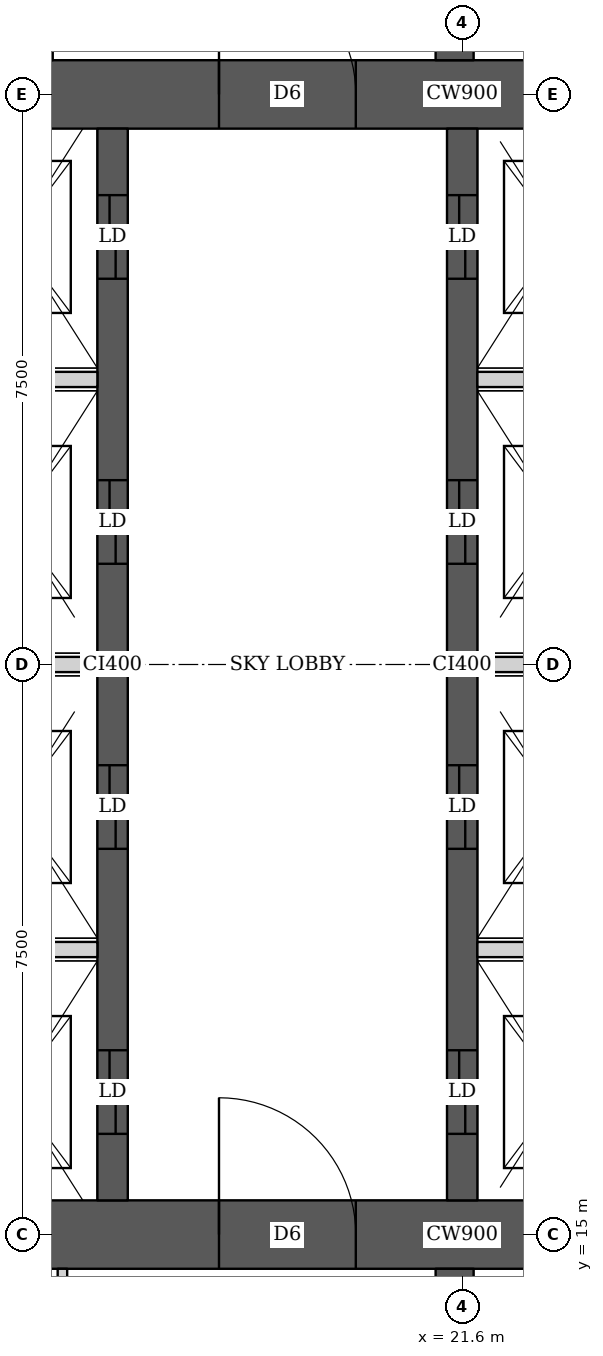
"""IFC4 building model, lengths in metres.
Left out: names, types, materials, properties, quantities, classifications, styles, units other than length and angle.
Written with IfcOpenShell. Run it as: python <this file> out.ifc"""

import sys

from ifc_helpers import new_model, si_unit, direction, frame, frame_2d, origin, place, context, subcontext, project, spatial, rectangle, extrude, element, fill, save


model = new_model("IFC4")
c1 = context("Model", 3, precision=1e-05, world=origin(), true_north=direction((0.0, 1.0)))
c2 = subcontext(c1, "Body", "Model", "MODEL_VIEW")
j1 = project(units=[si_unit("LENGTHUNIT", "METRE"), si_unit("PLANEANGLEUNIT", "RADIAN")], contexts=[c1])
p1 = place(None, origin())
s1 = spatial("IfcSite", under=j1, at=p1, CompositionType="ELEMENT")
p2 = place(p1, origin())
s2 = spatial("IfcBuilding", under=s1, at=p2, CompositionType="ELEMENT")
p3 = place(p2, frame((0.0, 0.0, 130.4)))
s3 = spatial("IfcBuildingStorey", under=s2, at=p3, CompositionType="ELEMENT", Elevation=130.4)
p4 = place(p3, frame((13.95, 15.0, 0.0), z_axis=(0.0, 0.0, 1.0), x_axis=(1.0, 0.0, 0.0)))
e1 = element("IfcWall", 1, at=p4, inside=s3, PredefinedType="SHEAR", context=c2, shape_type="SweptSolid", body=[
    extrude(rectangle(XDim=15.3, YDim=0.9, at=frame_2d((7.65, 0.0))), origin(), (0.0, 0.0, 1.0), 5.4),
])
p5 = place(p4, frame((4.45, 0.0, 0.0)))
e2 = element("IfcOpeningElement", 2, at=p5, cuts=e1, PredefinedType="OPENING", context=c2, shape_type="SweptSolid", body=[
    extrude(rectangle(XDim=1.8, YDim=2.1, at=frame_2d((0.9, 1.05))), frame((0.0, 0.46, 0.0), z_axis=(0.0, -1.0, 0.0), x_axis=(1.0, 0.0, 0.0)), (0.0, 0.0, 1.0), 0.92),
])
p6 = place(p4, frame((10.7, 0.0, 0.0)))
e3 = element("IfcOpeningElement", 3, at=p6, cuts=e1, PredefinedType="OPENING", context=c2, shape_type="SweptSolid", body=[
    extrude(rectangle(XDim=1.1, YDim=2.1, at=frame_2d((0.55, 1.05))), frame((0.0, 0.46, 0.0), z_axis=(0.0, -1.0, 0.0), x_axis=(1.0, 0.0, 0.0)), (0.0, 0.0, 1.0), 0.92),
])
p7 = place(p3, frame((13.95, 30.0, 0.0), z_axis=(0.0, 0.0, 1.0), x_axis=(1.0, 0.0, 0.0)))
e4 = element("IfcWall", 4, at=p7, inside=s3, PredefinedType="SHEAR", context=c2, shape_type="SweptSolid", body=[
    extrude(rectangle(XDim=15.3, YDim=0.9, at=frame_2d((7.65, 0.0))), origin(), (0.0, 0.0, 1.0), 5.4),
])
p8 = place(p7, frame((4.45, 0.0, 0.0)))
e5 = element("IfcOpeningElement", 5, at=p8, cuts=e4, PredefinedType="OPENING", context=c2, shape_type="SweptSolid", body=[
    extrude(rectangle(XDim=1.8, YDim=2.1, at=frame_2d((0.9, 1.05))), frame((0.0, 0.46, 0.0), z_axis=(0.0, -1.0, 0.0), x_axis=(1.0, 0.0, 0.0)), (0.0, 0.0, 1.0), 0.92),
])
p9 = place(p7, frame((10.7, 0.0, 0.0)))
e6 = element("IfcOpeningElement", 6, at=p9, cuts=e4, PredefinedType="OPENING", context=c2, shape_type="SweptSolid", body=[
    extrude(rectangle(XDim=1.1, YDim=2.1, at=frame_2d((0.55, 1.05))), frame((0.0, 0.46, 0.0), z_axis=(0.0, -1.0, 0.0), x_axis=(1.0, 0.0, 0.0)), (0.0, 0.0, 1.0), 0.92),
])
p10 = place(p3, frame((17.0, 15.45, 0.0), z_axis=(0.0, 0.0, 1.0), x_axis=(0.0, 1.0, 0.0)))
e7 = element("IfcWall", 7, at=p10, inside=s3, PredefinedType="SHEAR", context=c2, shape_type="SweptSolid", body=[
    extrude(rectangle(XDim=14.1, YDim=0.4, at=frame_2d((7.05, 0.0))), origin(), (0.0, 0.0, 1.0), 5.4),
])
p11 = place(p10, frame((0.875, 0.0, 0.0)))
e8 = element("IfcOpeningElement", 8, at=p11, cuts=e7, PredefinedType="OPENING", context=c2, shape_type="SweptSolid", body=[
    extrude(rectangle(XDim=1.1, YDim=2.1, at=frame_2d((0.55, 1.05))), frame((0.0, 0.21, 0.0), z_axis=(0.0, -1.0, 0.0), x_axis=(1.0, 0.0, 0.0)), (0.0, 0.0, 1.0), 0.42),
])
p12 = place(p10, frame((4.625, 0.0, 0.0)))
e9 = element("IfcOpeningElement", 9, at=p12, cuts=e7, PredefinedType="OPENING", context=c2, shape_type="SweptSolid", body=[
    extrude(rectangle(XDim=1.1, YDim=2.1, at=frame_2d((0.55, 1.05))), frame((0.0, 0.21, 0.0), z_axis=(0.0, -1.0, 0.0), x_axis=(1.0, 0.0, 0.0)), (0.0, 0.0, 1.0), 0.42),
])
p13 = place(p10, frame((8.375, 0.0, 0.0)))
e10 = element("IfcOpeningElement", 10, at=p13, cuts=e7, PredefinedType="OPENING", context=c2, shape_type="SweptSolid", body=[
    extrude(rectangle(XDim=1.1, YDim=2.1, at=frame_2d((0.55, 1.05))), frame((0.0, 0.21, 0.0), z_axis=(0.0, -1.0, 0.0), x_axis=(1.0, 0.0, 0.0)), (0.0, 0.0, 1.0), 0.42),
])
p14 = place(p10, frame((12.125, 0.0, 0.0)))
e11 = element("IfcOpeningElement", 11, at=p14, cuts=e7, PredefinedType="OPENING", context=c2, shape_type="SweptSolid", body=[
    extrude(rectangle(XDim=1.1, YDim=2.1, at=frame_2d((0.55, 1.05))), frame((0.0, 0.21, 0.0), z_axis=(0.0, -1.0, 0.0), x_axis=(1.0, 0.0, 0.0)), (0.0, 0.0, 1.0), 0.42),
])
p15 = place(p3, frame((21.6, 15.45, 0.0), z_axis=(0.0, 0.0, 1.0), x_axis=(0.0, 1.0, 0.0)))
e12 = element("IfcWall", 12, at=p15, inside=s3, PredefinedType="SHEAR", context=c2, shape_type="SweptSolid", body=[
    extrude(rectangle(XDim=14.1, YDim=0.4, at=frame_2d((7.05, 0.0))), origin(), (0.0, 0.0, 1.0), 5.4),
])
p16 = place(p15, frame((0.875, 0.0, 0.0)))
e13 = element("IfcOpeningElement", 13, at=p16, cuts=e12, PredefinedType="OPENING", context=c2, shape_type="SweptSolid", body=[
    extrude(rectangle(XDim=1.1, YDim=2.1, at=frame_2d((0.55, 1.05))), frame((0.0, 0.21, 0.0), z_axis=(0.0, -1.0, 0.0), x_axis=(1.0, 0.0, 0.0)), (0.0, 0.0, 1.0), 0.42),
])
p17 = place(p15, frame((4.625, 0.0, 0.0)))
e14 = element("IfcOpeningElement", 14, at=p17, cuts=e12, PredefinedType="OPENING", context=c2, shape_type="SweptSolid", body=[
    extrude(rectangle(XDim=1.1, YDim=2.1, at=frame_2d((0.55, 1.05))), frame((0.0, 0.21, 0.0), z_axis=(0.0, -1.0, 0.0), x_axis=(1.0, 0.0, 0.0)), (0.0, 0.0, 1.0), 0.42),
])
p18 = place(p15, frame((8.375, 0.0, 0.0)))
e15 = element("IfcOpeningElement", 15, at=p18, cuts=e12, PredefinedType="OPENING", context=c2, shape_type="SweptSolid", body=[
    extrude(rectangle(XDim=1.1, YDim=2.1, at=frame_2d((0.55, 1.05))), frame((0.0, 0.21, 0.0), z_axis=(0.0, -1.0, 0.0), x_axis=(1.0, 0.0, 0.0)), (0.0, 0.0, 1.0), 0.42),
])
p19 = place(p15, frame((12.125, 0.0, 0.0)))
e16 = element("IfcOpeningElement", 16, at=p19, cuts=e12, PredefinedType="OPENING", context=c2, shape_type="SweptSolid", body=[
    extrude(rectangle(XDim=1.1, YDim=2.1, at=frame_2d((0.55, 1.05))), frame((0.0, 0.21, 0.0), z_axis=(0.0, -1.0, 0.0), x_axis=(1.0, 0.0, 0.0)), (0.0, 0.0, 1.0), 0.42),
])
for number, where, z_axis, x_axis in (
    (17, (21.5, 10.35, 0.0), (0.0, 0.0, 1.0), (0.0, 1.0, 0.0)),
    (18, (21.5, 30.45, 0.0), (0.0, 0.0, 1.0), (0.0, 1.0, 0.0)),
):
    element("IfcWall", number, at=place(p3, frame(where, z_axis=z_axis, x_axis=x_axis)), inside=s3, PredefinedType="SHEAR", context=c2, shape_type="SweptSolid", body=[
        extrude(rectangle(XDim=4.2, YDim=0.5, at=frame_2d((2.1, 0.0))), origin(), (0.0, 0.0, 1.0), 5.4),
    ])
p20 = place(p3, frame((16.34, 10.163, 0.0), z_axis=(0.0, 0.0, 1.0), x_axis=(0.0, 1.0, 0.0)))
e19 = element("IfcWall", 19, at=p20, inside=s3, PredefinedType="PARTITIONING", context=c2, shape_type="SweptSolid", body=[
    extrude(rectangle(XDim=4.387, YDim=0.125, at=frame_2d((2.193, 0.0))), origin(), (0.0, 0.0, 1.0), 5.15),
])
p21 = place(p20, frame((1.637, 0.0, 0.0)))
e20 = element("IfcOpeningElement", 20, at=p21, cuts=e19, PredefinedType="OPENING", context=c2, shape_type="SweptSolid", body=[
    extrude(rectangle(XDim=1.0, YDim=2.1, at=frame_2d((0.5, 1.05))), frame((0.0, 0.073, 0.0), z_axis=(0.0, -1.0, 0.0), x_axis=(1.0, 0.0, 0.0)), (0.0, 0.0, 1.0), 0.145),
])
p22 = place(p3, frame((16.15, 30.45, 0.0), z_axis=(0.0, 0.0, 1.0), x_axis=(0.0, 1.0, 0.0)))
e21 = element("IfcWall", 21, at=p22, inside=s3, PredefinedType="PARTITIONING", context=c2, shape_type="SweptSolid", body=[
    extrude(rectangle(XDim=4.387, YDim=0.125, at=frame_2d((2.193, 0.0))), origin(), (0.0, 0.0, 1.0), 5.15),
])
p23 = place(p22, frame((1.75, 0.0, 0.0)))
e22 = element("IfcOpeningElement", 22, at=p23, cuts=e21, PredefinedType="OPENING", context=c2, shape_type="SweptSolid", body=[
    extrude(rectangle(XDim=1.0, YDim=2.1, at=frame_2d((0.5, 1.05))), frame((0.0, 0.073, 0.0), z_axis=(0.0, -1.0, 0.0), x_axis=(1.0, 0.0, 0.0)), (0.0, 0.0, 1.0), 0.145),
])
p24 = place(p3, frame((14.85, 18.75, 0.0), z_axis=(0.0, 0.0, 1.0), x_axis=(1.0, 0.0, 0.0)))
e23 = element("IfcWall", 23, at=p24, inside=s3, PredefinedType="SOLIDWALL", context=c2, shape_type="SweptSolid", body=[
    extrude(rectangle(XDim=1.95, YDim=0.2, at=frame_2d((0.975, 0.0))), origin(), (0.0, 0.0, 1.0), 5.15),
])
p25 = place(p3, frame((21.8, 18.75, 0.0), z_axis=(0.0, 0.0, 1.0), x_axis=(1.0, 0.0, 0.0)))
e24 = element("IfcWall", 24, at=p25, inside=s3, PredefinedType="SOLIDWALL", context=c2, shape_type="SweptSolid", body=[
    extrude(rectangle(XDim=2.2, YDim=0.2, at=frame_2d((1.1, 0.0))), origin(), (0.0, 0.0, 1.0), 5.15),
])
p26 = place(p3, frame((14.85, 22.5, 0.0), z_axis=(0.0, 0.0, 1.0), x_axis=(1.0, 0.0, 0.0)))
e25 = element("IfcWall", 25, at=p26, inside=s3, PredefinedType="SOLIDWALL", context=c2, shape_type="SweptSolid", body=[
    extrude(rectangle(XDim=1.95, YDim=0.2, at=frame_2d((0.975, 0.0))), origin(), (0.0, 0.0, 1.0), 5.15),
])
p27 = place(p3, frame((21.8, 22.5, 0.0), z_axis=(0.0, 0.0, 1.0), x_axis=(1.0, 0.0, 0.0)))
e26 = element("IfcWall", 26, at=p27, inside=s3, PredefinedType="SOLIDWALL", context=c2, shape_type="SweptSolid", body=[
    extrude(rectangle(XDim=2.2, YDim=0.2, at=frame_2d((1.1, 0.0))), origin(), (0.0, 0.0, 1.0), 5.15),
])
p28 = place(p3, frame((14.85, 26.25, 0.0), z_axis=(0.0, 0.0, 1.0), x_axis=(1.0, 0.0, 0.0)))
e27 = element("IfcWall", 27, at=p28, inside=s3, PredefinedType="SOLIDWALL", context=c2, shape_type="SweptSolid", body=[
    extrude(rectangle(XDim=1.95, YDim=0.2, at=frame_2d((0.975, 0.0))), origin(), (0.0, 0.0, 1.0), 5.15),
])
p29 = place(p3, frame((21.8, 26.25, 0.0), z_axis=(0.0, 0.0, 1.0), x_axis=(1.0, 0.0, 0.0)))
e28 = element("IfcWall", 28, at=p29, inside=s3, PredefinedType="SOLIDWALL", context=c2, shape_type="SweptSolid", body=[
    extrude(rectangle(XDim=2.2, YDim=0.2, at=frame_2d((1.1, 0.0))), origin(), (0.0, 0.0, 1.0), 5.15),
])
p30 = place(p5, origin())
e29 = element("IfcDoor", 29, at=p30, inside=s3, OperationType="DOUBLE_DOOR_SINGLE_SWING", PredefinedType="DOOR", context=c2, shape_type="SweptSolid", body=[
    extrude(rectangle(XDim=1.8, YDim=2.1, at=frame_2d((0.9, 1.05))), frame((0.0, 0.025, 0.0), z_axis=(0.0, -1.0, 0.0), x_axis=(1.0, 0.0, 0.0)), (0.0, 0.0, 1.0), 0.05),
])
fill(e2, e29)
p31 = place(p8, origin())
e30 = element("IfcDoor", 30, at=p31, inside=s3, OperationType="DOUBLE_DOOR_SINGLE_SWING", PredefinedType="DOOR", context=c2, shape_type="SweptSolid", body=[
    extrude(rectangle(XDim=1.8, YDim=2.1, at=frame_2d((0.9, 1.05))), frame((0.0, 0.025, 0.0), z_axis=(0.0, -1.0, 0.0), x_axis=(1.0, 0.0, 0.0)), (0.0, 0.0, 1.0), 0.05),
])
fill(e5, e30)
p32 = place(p11, origin())
e31 = element("IfcDoor", 31, at=p32, inside=s3, OperationType="DOUBLE_DOOR_SLIDING", PredefinedType="DOOR", context=c2, shape_type="SweptSolid", body=[
    extrude(rectangle(XDim=1.1, YDim=2.1, at=frame_2d((0.55, 1.05))), frame((0.0, 0.025, 0.0), z_axis=(0.0, -1.0, 0.0), x_axis=(1.0, 0.0, 0.0)), (0.0, 0.0, 1.0), 0.05),
])
fill(e8, e31)
p33 = place(p12, origin())
e32 = element("IfcDoor", 32, at=p33, inside=s3, OperationType="DOUBLE_DOOR_SLIDING", PredefinedType="DOOR", context=c2, shape_type="SweptSolid", body=[
    extrude(rectangle(XDim=1.1, YDim=2.1, at=frame_2d((0.55, 1.05))), frame((0.0, 0.025, 0.0), z_axis=(0.0, -1.0, 0.0), x_axis=(1.0, 0.0, 0.0)), (0.0, 0.0, 1.0), 0.05),
])
fill(e9, e32)
p34 = place(p13, origin())
e33 = element("IfcDoor", 33, at=p34, inside=s3, OperationType="DOUBLE_DOOR_SLIDING", PredefinedType="DOOR", context=c2, shape_type="SweptSolid", body=[
    extrude(rectangle(XDim=1.1, YDim=2.1, at=frame_2d((0.55, 1.05))), frame((0.0, 0.025, 0.0), z_axis=(0.0, -1.0, 0.0), x_axis=(1.0, 0.0, 0.0)), (0.0, 0.0, 1.0), 0.05),
])
fill(e10, e33)
p35 = place(p14, origin())
e34 = element("IfcDoor", 34, at=p35, inside=s3, OperationType="DOUBLE_DOOR_SLIDING", PredefinedType="DOOR", context=c2, shape_type="SweptSolid", body=[
    extrude(rectangle(XDim=1.1, YDim=2.1, at=frame_2d((0.55, 1.05))), frame((0.0, 0.025, 0.0), z_axis=(0.0, -1.0, 0.0), x_axis=(1.0, 0.0, 0.0)), (0.0, 0.0, 1.0), 0.05),
])
fill(e11, e34)
p36 = place(p16, origin())
e35 = element("IfcDoor", 35, at=p36, inside=s3, OperationType="DOUBLE_DOOR_SLIDING", PredefinedType="DOOR", context=c2, shape_type="SweptSolid", body=[
    extrude(rectangle(XDim=1.1, YDim=2.1, at=frame_2d((0.55, 1.05))), frame((0.0, 0.025, 0.0), z_axis=(0.0, -1.0, 0.0), x_axis=(1.0, 0.0, 0.0)), (0.0, 0.0, 1.0), 0.05),
])
fill(e13, e35)
p37 = place(p17, origin())
e36 = element("IfcDoor", 36, at=p37, inside=s3, OperationType="DOUBLE_DOOR_SLIDING", PredefinedType="DOOR", context=c2, shape_type="SweptSolid", body=[
    extrude(rectangle(XDim=1.1, YDim=2.1, at=frame_2d((0.55, 1.05))), frame((0.0, 0.025, 0.0), z_axis=(0.0, -1.0, 0.0), x_axis=(1.0, 0.0, 0.0)), (0.0, 0.0, 1.0), 0.05),
])
fill(e14, e36)
p38 = place(p18, origin())
e37 = element("IfcDoor", 37, at=p38, inside=s3, OperationType="DOUBLE_DOOR_SLIDING", PredefinedType="DOOR", context=c2, shape_type="SweptSolid", body=[
    extrude(rectangle(XDim=1.1, YDim=2.1, at=frame_2d((0.55, 1.05))), frame((0.0, 0.025, 0.0), z_axis=(0.0, -1.0, 0.0), x_axis=(1.0, 0.0, 0.0)), (0.0, 0.0, 1.0), 0.05),
])
fill(e15, e37)
p39 = place(p19, origin())
e38 = element("IfcDoor", 38, at=p39, inside=s3, OperationType="DOUBLE_DOOR_SLIDING", PredefinedType="DOOR", context=c2, shape_type="SweptSolid", body=[
    extrude(rectangle(XDim=1.1, YDim=2.1, at=frame_2d((0.55, 1.05))), frame((0.0, 0.025, 0.0), z_axis=(0.0, -1.0, 0.0), x_axis=(1.0, 0.0, 0.0)), (0.0, 0.0, 1.0), 0.05),
])
fill(e16, e38)
save(model, sys.argv[1])
